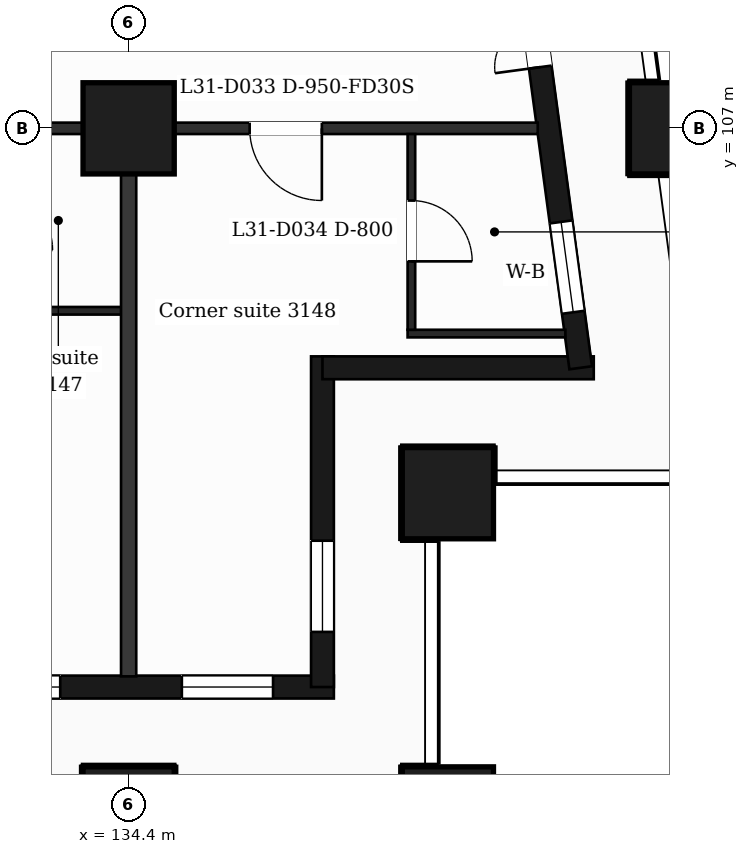
"""IFC4 building model, lengths in metres.
Left out: names, types, materials, properties, quantities, classifications, styles, units other than length and angle.
Written with IfcOpenShell. Run it as: python <this file> out.ifc"""

import sys

from ifc_helpers import new_model, si_unit, direction, frame, frame_2d, origin, origin_2d, place, context, subcontext, project, spatial, rectangle, extrude, element, fill, save


model = new_model("IFC4")
c1 = context("Model", 3, precision=1e-05, world=origin(), true_north=direction((0.0, 1.0)))
c2 = subcontext(c1, "Body", "Model", "MODEL_VIEW")
j1 = project(units=[si_unit("LENGTHUNIT", "METRE"), si_unit("PLANEANGLEUNIT", "RADIAN")], contexts=[c1])
p1 = place(None, origin())
s1 = spatial("IfcSite", under=j1, at=p1, CompositionType="ELEMENT")
p2 = place(p1, origin())
s2 = spatial("IfcBuilding", under=s1, at=p2, CompositionType="ELEMENT")
p3 = place(p2, frame((0.0, 0.0, 131.7)))
s3 = spatial("IfcBuildingStorey", under=s2, at=p3, CompositionType="ELEMENT", Elevation=131.7)
for number, where, z_axis, x_axis in (
    (1, (134.4, 98.0, 0.0), (0.0, 0.0, 1.0), (1.0, 0.0, 0.0)),
    (2, (138.6, 98.0, 0.0), (0.0, 0.0, 1.0), (1.0, 0.0, 0.0)),
    (3, (138.6, 102.2, 0.0), (0.0, 0.0, 1.0), (1.0, 0.0, 0.0)),
    (4, (134.4, 107.0, 0.0), (0.0, 0.0, 1.0), (1.0, 0.0, 0.0)),
    (5, (141.588, 107.0, 0.0), (0.0, 0.0, 1.0), (1.0, 0.0, 0.0)),
):
    element("IfcColumn", number, at=place(p3, frame(where, z_axis=z_axis, x_axis=x_axis)), inside=s3, PredefinedType="COLUMN", context=c2, shape_type="SweptSolid", body=[
        extrude(rectangle(XDim=1.2, YDim=1.2, at=origin_2d()), origin(), (0.0, 0.0, 1.0), 3.7),
    ])
p4 = place(p3, frame((89.85, 99.65, 0.0), z_axis=(0.0, 0.0, 1.0), x_axis=(1.0, 0.0, 0.0)))
e6 = element("IfcWall", 6, at=p4, inside=s3, PredefinedType="SOLIDWALL", context=c2, shape_type="SweptSolid", body=[
    extrude(rectangle(XDim=47.25, YDim=0.3, at=frame_2d((23.625, 0.0))), origin(), (0.0, 0.0, 1.0), 3.2),
])
p5 = place(p4, frame((0.725, 0.0, 0.9)))
e7 = element("IfcOpeningElement", 7, at=p5, cuts=e6, PredefinedType="OPENING", context=c2, shape_type="SweptSolid", body=[
    extrude(rectangle(XDim=1.2, YDim=2.1, at=frame_2d((0.6, 1.05))), frame((0.0, 0.16, 0.0), z_axis=(0.0, -1.0, 0.0), x_axis=(1.0, 0.0, 0.0)), (0.0, 0.0, 1.0), 0.32),
])
p6 = place(p4, frame((3.45, 0.0, 0.9)))
e8 = element("IfcOpeningElement", 8, at=p6, cuts=e6, PredefinedType="OPENING", context=c2, shape_type="SweptSolid", body=[
    extrude(rectangle(XDim=2.4, YDim=2.1, at=frame_2d((1.2, 1.05))), frame((0.0, 0.16, 0.0), z_axis=(0.0, -1.0, 0.0), x_axis=(1.0, 0.0, 0.0)), (0.0, 0.0, 1.0), 0.32),
])
p7 = place(p4, frame((7.35, 0.0, 0.0)))
e9 = element("IfcOpeningElement", 9, at=p7, cuts=e6, PredefinedType="OPENING", context=c2, shape_type="SweptSolid", body=[
    extrude(rectangle(XDim=1.2, YDim=2.4, at=frame_2d((0.6, 1.2))), frame((0.0, 0.16, 0.0), z_axis=(0.0, -1.0, 0.0), x_axis=(1.0, 0.0, 0.0)), (0.0, 0.0, 1.0), 0.32),
])
p8 = place(p4, frame((9.15, 0.0, 0.9)))
e10 = element("IfcOpeningElement", 10, at=p8, cuts=e6, PredefinedType="OPENING", context=c2, shape_type="SweptSolid", body=[
    extrude(rectangle(XDim=1.2, YDim=2.1, at=frame_2d((0.6, 1.05))), frame((0.0, 0.16, 0.0), z_axis=(0.0, -1.0, 0.0), x_axis=(1.0, 0.0, 0.0)), (0.0, 0.0, 1.0), 0.32),
])
p9 = place(p4, frame((11.85, 0.0, 0.9)))
e11 = element("IfcOpeningElement", 11, at=p9, cuts=e6, PredefinedType="OPENING", context=c2, shape_type="SweptSolid", body=[
    extrude(rectangle(XDim=2.4, YDim=2.1, at=frame_2d((1.2, 1.05))), frame((0.0, 0.16, 0.0), z_axis=(0.0, -1.0, 0.0), x_axis=(1.0, 0.0, 0.0)), (0.0, 0.0, 1.0), 0.32),
])
p10 = place(p4, frame((16.05, 0.0, 0.9)))
e12 = element("IfcOpeningElement", 12, at=p10, cuts=e6, PredefinedType="OPENING", context=c2, shape_type="SweptSolid", body=[
    extrude(rectangle(XDim=2.4, YDim=2.1, at=frame_2d((1.2, 1.05))), frame((0.0, 0.16, 0.0), z_axis=(0.0, -1.0, 0.0), x_axis=(1.0, 0.0, 0.0)), (0.0, 0.0, 1.0), 0.32),
])
p11 = place(p4, frame((20.85, 0.0, 0.9)))
e13 = element("IfcOpeningElement", 13, at=p11, cuts=e6, PredefinedType="OPENING", context=c2, shape_type="SweptSolid", body=[
    extrude(rectangle(XDim=1.2, YDim=2.1, at=frame_2d((0.6, 1.05))), frame((0.0, 0.16, 0.0), z_axis=(0.0, -1.0, 0.0), x_axis=(1.0, 0.0, 0.0)), (0.0, 0.0, 1.0), 0.32),
])
p12 = place(p4, frame((25.05, 0.0, 0.9)))
e14 = element("IfcOpeningElement", 14, at=p12, cuts=e6, PredefinedType="OPENING", context=c2, shape_type="SweptSolid", body=[
    extrude(rectangle(XDim=1.2, YDim=2.1, at=frame_2d((0.6, 1.05))), frame((0.0, 0.16, 0.0), z_axis=(0.0, -1.0, 0.0), x_axis=(1.0, 0.0, 0.0)), (0.0, 0.0, 1.0), 0.32),
])
p13 = place(p4, frame((28.65, 0.0, 0.9)))
e15 = element("IfcOpeningElement", 15, at=p13, cuts=e6, PredefinedType="OPENING", context=c2, shape_type="SweptSolid", body=[
    extrude(rectangle(XDim=2.4, YDim=2.1, at=frame_2d((1.2, 1.05))), frame((0.0, 0.16, 0.0), z_axis=(0.0, -1.0, 0.0), x_axis=(1.0, 0.0, 0.0)), (0.0, 0.0, 1.0), 0.32),
])
p14 = place(p4, frame((32.85, 0.0, 0.9)))
e16 = element("IfcOpeningElement", 16, at=p14, cuts=e6, PredefinedType="OPENING", context=c2, shape_type="SweptSolid", body=[
    extrude(rectangle(XDim=2.4, YDim=2.1, at=frame_2d((1.2, 1.05))), frame((0.0, 0.16, 0.0), z_axis=(0.0, -1.0, 0.0), x_axis=(1.0, 0.0, 0.0)), (0.0, 0.0, 1.0), 0.32),
])
p15 = place(p4, frame((37.05, 0.0, 0.9)))
e17 = element("IfcOpeningElement", 17, at=p15, cuts=e6, PredefinedType="OPENING", context=c2, shape_type="SweptSolid", body=[
    extrude(rectangle(XDim=2.4, YDim=2.1, at=frame_2d((1.2, 1.05))), frame((0.0, 0.16, 0.0), z_axis=(0.0, -1.0, 0.0), x_axis=(1.0, 0.0, 0.0)), (0.0, 0.0, 1.0), 0.32),
])
p16 = place(p4, frame((41.25, 0.0, 0.9)))
e18 = element("IfcOpeningElement", 18, at=p16, cuts=e6, PredefinedType="OPENING", context=c2, shape_type="SweptSolid", body=[
    extrude(rectangle(XDim=2.4, YDim=2.1, at=frame_2d((1.2, 1.05))), frame((0.0, 0.16, 0.0), z_axis=(0.0, -1.0, 0.0), x_axis=(1.0, 0.0, 0.0)), (0.0, 0.0, 1.0), 0.32),
])
p17 = place(p4, frame((45.25, 0.0, 0.9)))
e19 = element("IfcOpeningElement", 19, at=p17, cuts=e6, PredefinedType="OPENING", context=c2, shape_type="SweptSolid", body=[
    extrude(rectangle(XDim=1.2, YDim=2.1, at=frame_2d((0.6, 1.05))), frame((0.0, 0.16, 0.0), z_axis=(0.0, -1.0, 0.0), x_axis=(1.0, 0.0, 0.0)), (0.0, 0.0, 1.0), 0.32),
])
p18 = place(p3, frame((136.95, 99.65, 0.0), z_axis=(0.0, 0.0, 1.0), x_axis=(0.0, 1.0, 0.0)))
e20 = element("IfcWall", 20, at=p18, inside=s3, PredefinedType="SOLIDWALL", context=c2, shape_type="SweptSolid", body=[
    extrude(rectangle(XDim=4.35, YDim=0.3, at=frame_2d((2.175, 0.0))), origin(), (0.0, 0.0, 1.0), 3.2),
])
p19 = place(p18, frame((0.725, 0.0, 0.9)))
e21 = element("IfcOpeningElement", 21, at=p19, cuts=e20, PredefinedType="OPENING", context=c2, shape_type="SweptSolid", body=[
    extrude(rectangle(XDim=1.2, YDim=2.1, at=frame_2d((0.6, 1.05))), frame((0.0, 0.16, 0.0), z_axis=(0.0, -1.0, 0.0), x_axis=(1.0, 0.0, 0.0)), (0.0, 0.0, 1.0), 0.32),
])
p20 = place(p3, frame((136.95, 103.85, 0.0), z_axis=(0.0, 0.0, 1.0), x_axis=(1.0, 0.0, 0.0)))
e22 = element("IfcWall", 22, at=p20, inside=s3, PredefinedType="SOLIDWALL", context=c2, shape_type="SweptSolid", body=[
    extrude(rectangle(XDim=3.569, YDim=0.3, at=frame_2d((1.785, 0.0))), origin(), (0.0, 0.0, 1.0), 3.2),
])
p21 = place(p3, frame((140.348, 103.85, 0.0), z_axis=(0.0, 0.0, 1.0), x_axis=(-0.133431549479, 0.991058031401, 0.0)))
e23 = element("IfcWall", 23, at=p21, inside=s3, PredefinedType="SOLIDWALL", context=c2, shape_type="SweptSolid", body=[
    extrude(rectangle(XDim=6.609, YDim=0.3, at=frame_2d((3.304, 0.0))), origin(), (0.0, 0.0, 1.0), 3.2),
])
p22 = place(p21, frame((0.737, 0.0, 0.9)))
e24 = element("IfcOpeningElement", 24, at=p22, cuts=e23, PredefinedType="OPENING", context=c2, shape_type="SweptSolid", body=[
    extrude(rectangle(XDim=1.2, YDim=2.1, at=frame_2d((0.6, 1.05))), frame((0.0, 0.16, 0.0), z_axis=(0.0, -1.0, 0.0), x_axis=(1.0, 0.0, 0.0)), (0.0, 0.0, 1.0), 0.32),
])
p23 = place(p21, frame((3.991, 0.0, 0.0)))
e25 = element("IfcOpeningElement", 25, at=p23, cuts=e23, PredefinedType="OPENING", context=c2, shape_type="SweptSolid", body=[
    extrude(rectangle(XDim=1.2, YDim=2.4, at=frame_2d((0.6, 1.2))), frame((0.0, 0.16, 0.0), z_axis=(0.0, -1.0, 0.0), x_axis=(1.0, 0.0, 0.0)), (0.0, 0.0, 1.0), 0.32),
])
p24 = place(p3, frame((138.07, 104.3, 0.0), z_axis=(0.0, 0.0, 1.0), x_axis=(1.0, 0.0, 0.0)))
e26 = element("IfcWall", 26, at=p24, inside=s3, PredefinedType="PARTITIONING", context=c2, shape_type="SweptSolid", body=[
    extrude(rectangle(XDim=2.076, YDim=0.1, at=frame_2d((1.038, 0.0))), origin(), (0.0, 0.0, 1.0), 3.2),
])
p25 = place(p3, frame((132.55, 104.6, 0.0), z_axis=(0.0, 0.0, 1.0), x_axis=(1.0, 0.0, 0.0)))
e27 = element("IfcWall", 27, at=p25, inside=s3, PredefinedType="PARTITIONING", context=c2, shape_type="SweptSolid", body=[
    extrude(rectangle(XDim=1.85, YDim=0.1, at=frame_2d((0.925, 0.0))), origin(), (0.0, 0.0, 1.0), 3.2),
])
p26 = place(p3, frame((87.018, 107.0, 0.0), z_axis=(0.0, 0.0, 1.0), x_axis=(1.0, 0.0, 0.0)))
e28 = element("IfcWall", 28, at=p26, inside=s3, PredefinedType="PARTITIONING", context=c2, shape_type="SweptSolid", body=[
    extrude(rectangle(XDim=52.765, YDim=0.15, at=frame_2d((26.382, 0.0))), origin(), (0.0, 0.0, 1.0), 3.2),
])
p27 = place(p26, frame((1.276, 0.0, 0.0)))
e29 = element("IfcOpeningElement", 29, at=p27, cuts=e28, PredefinedType="OPENING", context=c2, shape_type="SweptSolid", body=[
    extrude(rectangle(XDim=0.95, YDim=2.1, at=frame_2d((0.475, 1.05))), frame((0.0, 0.085, 0.0), z_axis=(0.0, -1.0, 0.0), x_axis=(1.0, 0.0, 0.0)), (0.0, 0.0, 1.0), 0.17),
])
p28 = place(p26, frame((7.645, 0.0, 0.0)))
e30 = element("IfcOpeningElement", 30, at=p28, cuts=e28, PredefinedType="OPENING", context=c2, shape_type="SweptSolid", body=[
    extrude(rectangle(XDim=0.95, YDim=2.1, at=frame_2d((0.475, 1.05))), frame((0.0, 0.085, 0.0), z_axis=(0.0, -1.0, 0.0), x_axis=(1.0, 0.0, 0.0)), (0.0, 0.0, 1.0), 0.17),
])
p29 = place(p26, frame((16.812, 0.0, 0.0)))
e31 = element("IfcOpeningElement", 31, at=p29, cuts=e28, PredefinedType="OPENING", context=c2, shape_type="SweptSolid", body=[
    extrude(rectangle(XDim=1.0, YDim=2.1, at=frame_2d((0.5, 1.05))), frame((0.0, 0.085, 0.0), z_axis=(0.0, -1.0, 0.0), x_axis=(1.0, 0.0, 0.0)), (0.0, 0.0, 1.0), 0.17),
])
p30 = place(p26, frame((22.952, 0.0, 0.0)))
e32 = element("IfcOpeningElement", 32, at=p30, cuts=e28, PredefinedType="OPENING", context=c2, shape_type="SweptSolid", body=[
    extrude(rectangle(XDim=0.95, YDim=2.1, at=frame_2d((0.475, 1.05))), frame((0.0, 0.085, 0.0), z_axis=(0.0, -1.0, 0.0), x_axis=(1.0, 0.0, 0.0)), (0.0, 0.0, 1.0), 0.17),
])
p31 = place(p26, frame((31.742, 0.0, 0.0)))
e33 = element("IfcOpeningElement", 33, at=p31, cuts=e28, PredefinedType="OPENING", context=c2, shape_type="SweptSolid", body=[
    extrude(rectangle(XDim=0.95, YDim=2.1, at=frame_2d((0.475, 1.05))), frame((0.0, 0.085, 0.0), z_axis=(0.0, -1.0, 0.0), x_axis=(1.0, 0.0, 0.0)), (0.0, 0.0, 1.0), 0.17),
])
p32 = place(p26, frame((35.169, 0.0, 0.0)))
e34 = element("IfcOpeningElement", 34, at=p32, cuts=e28, PredefinedType="OPENING", context=c2, shape_type="SweptSolid", body=[
    extrude(rectangle(XDim=0.95, YDim=2.1, at=frame_2d((0.475, 1.05))), frame((0.0, 0.085, 0.0), z_axis=(0.0, -1.0, 0.0), x_axis=(1.0, 0.0, 0.0)), (0.0, 0.0, 1.0), 0.17),
])
p33 = place(p26, frame((41.807, 0.0, 0.0)))
e35 = element("IfcOpeningElement", 35, at=p33, cuts=e28, PredefinedType="OPENING", context=c2, shape_type="SweptSolid", body=[
    extrude(rectangle(XDim=0.95, YDim=2.1, at=frame_2d((0.475, 1.05))), frame((0.0, 0.085, 0.0), z_axis=(0.0, -1.0, 0.0), x_axis=(1.0, 0.0, 0.0)), (0.0, 0.0, 1.0), 0.17),
])
p34 = place(p26, frame((43.832, 0.0, 0.0)))
e36 = element("IfcOpeningElement", 36, at=p34, cuts=e28, PredefinedType="OPENING", context=c2, shape_type="SweptSolid", body=[
    extrude(rectangle(XDim=0.95, YDim=2.1, at=frame_2d((0.475, 1.05))), frame((0.0, 0.085, 0.0), z_axis=(0.0, -1.0, 0.0), x_axis=(1.0, 0.0, 0.0)), (0.0, 0.0, 1.0), 0.17),
])
p35 = place(p26, frame((48.974, 0.0, 0.0)))
e37 = element("IfcOpeningElement", 37, at=p35, cuts=e28, PredefinedType="OPENING", context=c2, shape_type="SweptSolid", body=[
    extrude(rectangle(XDim=0.95, YDim=2.1, at=frame_2d((0.475, 1.05))), frame((0.0, 0.085, 0.0), z_axis=(0.0, -1.0, 0.0), x_axis=(1.0, 0.0, 0.0)), (0.0, 0.0, 1.0), 0.17),
])
p36 = place(p3, frame((134.4, 99.79, 0.0), z_axis=(0.0, 0.0, 1.0), x_axis=(0.0, 1.0, 0.0)))
e38 = element("IfcWall", 38, at=p36, inside=s3, PredefinedType="PARTITIONING", context=c2, shape_type="SweptSolid", body=[
    extrude(rectangle(XDim=7.135, YDim=0.2, at=frame_2d((3.567, 0.0))), origin(), (0.0, 0.0, 1.0), 3.2),
])
p37 = place(p3, frame((138.12, 104.35, 0.0), z_axis=(0.0, 0.0, 1.0), x_axis=(0.0, 1.0, 0.0)))
e39 = element("IfcWall", 39, at=p37, inside=s3, PredefinedType="PARTITIONING", context=c2, shape_type="SweptSolid", body=[
    extrude(rectangle(XDim=2.575, YDim=0.1, at=frame_2d((1.288, 0.0))), origin(), (0.0, 0.0, 1.0), 3.2),
])
p38 = place(p37, frame((0.9, 0.0, 0.0)))
e40 = element("IfcOpeningElement", 40, at=p38, cuts=e39, PredefinedType="OPENING", context=c2, shape_type="SweptSolid", body=[
    extrude(rectangle(XDim=0.8, YDim=2.1, at=frame_2d((0.4, 1.05))), frame((0.0, 0.06, 0.0), z_axis=(0.0, -1.0, 0.0), x_axis=(1.0, 0.0, 0.0)), (0.0, 0.0, 1.0), 0.12),
])
p39 = place(p16, origin())
e41 = element("IfcWindow", 41, at=p39, inside=s3, PartitioningType="SINGLE_PANEL", PredefinedType="WINDOW", context=c2, shape_type="SweptSolid", body=[
    extrude(rectangle(XDim=2.4, YDim=2.1, at=frame_2d((1.2, 1.05))), frame((0.0, 0.03, 0.0), z_axis=(0.0, -1.0, 0.0), x_axis=(1.0, 0.0, 0.0)), (0.0, 0.0, 1.0), 0.06),
])
fill(e18, e41)
p40 = place(p17, origin())
e42 = element("IfcWindow", 42, at=p40, inside=s3, PartitioningType="SINGLE_PANEL", PredefinedType="WINDOW", context=c2, shape_type="SweptSolid", body=[
    extrude(rectangle(XDim=1.2, YDim=2.1, at=frame_2d((0.6, 1.05))), frame((0.0, 0.03, 0.0), z_axis=(0.0, -1.0, 0.0), x_axis=(1.0, 0.0, 0.0)), (0.0, 0.0, 1.0), 0.06),
])
fill(e19, e42)
p41 = place(p19, origin())
e43 = element("IfcWindow", 43, at=p41, inside=s3, PartitioningType="SINGLE_PANEL", PredefinedType="WINDOW", context=c2, shape_type="SweptSolid", body=[
    extrude(rectangle(XDim=1.2, YDim=2.1, at=frame_2d((0.6, 1.05))), frame((0.0, 0.03, 0.0), z_axis=(0.0, -1.0, 0.0), x_axis=(1.0, 0.0, 0.0)), (0.0, 0.0, 1.0), 0.06),
])
fill(e21, e43)
p42 = place(p22, origin())
e44 = element("IfcWindow", 44, at=p42, inside=s3, PartitioningType="SINGLE_PANEL", PredefinedType="WINDOW", context=c2, shape_type="SweptSolid", body=[
    extrude(rectangle(XDim=1.2, YDim=2.1, at=frame_2d((0.6, 1.05))), frame((0.0, 0.03, 0.0), z_axis=(0.0, -1.0, 0.0), x_axis=(1.0, 0.0, 0.0)), (0.0, 0.0, 1.0), 0.06),
])
fill(e24, e44)
p43 = place(p23, origin())
e45 = element("IfcDoor", 45, at=p43, inside=s3, OperationType="DOUBLE_DOOR_SINGLE_SWING", PredefinedType="DOOR", context=c2, shape_type="SweptSolid", body=[
    extrude(rectangle(XDim=1.2, YDim=2.4, at=frame_2d((0.6, 1.2))), frame((0.0, 0.025, 0.0), z_axis=(0.0, -1.0, 0.0), x_axis=(1.0, 0.0, 0.0)), (0.0, 0.0, 1.0), 0.05),
])
fill(e25, e45)
p44 = place(p35, origin())
e46 = element("IfcDoor", 46, at=p44, inside=s3, OperationType="SINGLE_SWING_RIGHT", PredefinedType="DOOR", context=c2, shape_type="SweptSolid", body=[
    extrude(rectangle(XDim=0.95, YDim=2.1, at=frame_2d((0.475, 1.05))), frame((0.0, 0.025, 0.0), z_axis=(0.0, -1.0, 0.0), x_axis=(1.0, 0.0, 0.0)), (0.0, 0.0, 1.0), 0.05),
])
fill(e37, e46)
p45 = place(p38, origin())
e47 = element("IfcDoor", 47, at=p45, inside=s3, OperationType="SINGLE_SWING_LEFT", PredefinedType="DOOR", context=c2, shape_type="SweptSolid", body=[
    extrude(rectangle(XDim=0.8, YDim=2.1, at=frame_2d((0.4, 1.05))), frame((0.0, 0.025, 0.0), z_axis=(0.0, -1.0, 0.0), x_axis=(1.0, 0.0, 0.0)), (0.0, 0.0, 1.0), 0.05),
])
fill(e40, e47)
save(model, sys.argv[1])
